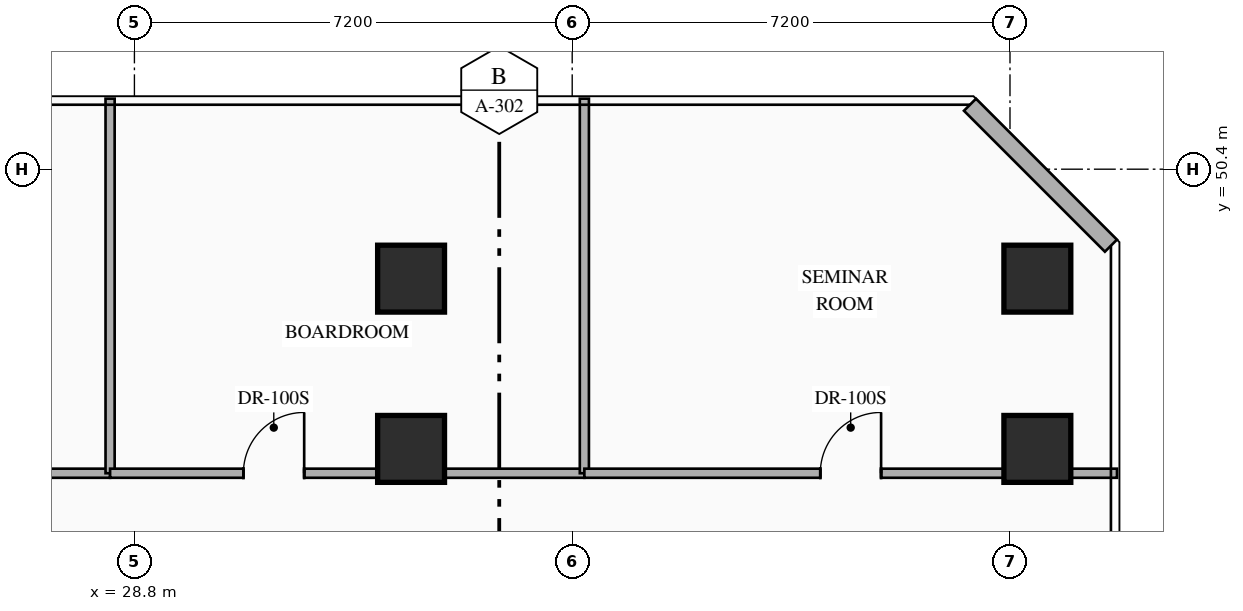
"""IFC4 building model, lengths in metres.
Left out: names, types, materials, properties, quantities, classifications, styles, units other than length and angle.
Written with IfcOpenShell. Run it as: python <this file> out.ifc"""

import sys

from ifc_helpers import new_model, si_unit, direction, frame, frame_2d, origin, origin_2d, place, context, subcontext, project, spatial, rectangle, hollow_rectangle, extrude, element, fill, save


model = new_model("IFC4")
c1 = context("Model", 3, precision=1e-05, world=origin(), true_north=direction((0.0, 1.0)))
c2 = subcontext(c1, "Body", "Model", "MODEL_VIEW")
j1 = project(units=[si_unit("LENGTHUNIT", "METRE"), si_unit("PLANEANGLEUNIT", "RADIAN")], contexts=[c1])
p1 = place(None, origin())
s1 = spatial("IfcSite", under=j1, at=p1, CompositionType="ELEMENT")
p2 = place(p1, origin())
s2 = spatial("IfcBuilding", under=s1, at=p2, CompositionType="ELEMENT")
p3 = place(p2, frame((0.0, 0.0, 21.6)))
s3 = spatial("IfcBuildingStorey", under=s2, at=p3, CompositionType="ELEMENT", Elevation=21.6)
for number, where, z_axis, x_axis in (
    (1, (33.35, 45.8, 0.0), (0.0, 0.0, 1.0), (1.0, 0.0, 0.0)),
    (2, (43.65, 45.8, 0.0), (0.0, 0.0, 1.0), (1.0, 0.0, 0.0)),
    (3, (33.35, 48.6, 0.0), (0.0, 0.0, 1.0), (1.0, 0.0, 0.0)),
    (4, (43.65, 48.6, 0.0), (0.0, 0.0, 1.0), (1.0, 0.0, 0.0)),
):
    element("IfcColumn", number, at=place(p3, frame(where, z_axis=z_axis, x_axis=x_axis)), inside=s3, PredefinedType="COLUMN", context=c2, shape_type="SweptSolid", body=[
        extrude(hollow_rectangle(XDim=1.1, YDim=1.1, WallThickness=0.04, at=origin_2d()), origin(), (0.0, 0.0, 1.0), 5.4),
    ])
p4 = place(p3, frame((42.542, 51.46, 0.0), z_axis=(0.0, 0.0, 1.0), x_axis=(0.707144017911, -0.707069542501, 0.0)))
e5 = element("IfcWall", 5, at=p4, inside=s3, PredefinedType="STANDARD", context=c2, shape_type="SweptSolid", body=[
    extrude(rectangle(XDim=3.278, YDim=0.28, at=frame_2d((1.639, 0.0))), origin(), (0.0, 0.0, 1.0), 5.1),
])
p5 = place(p3, frame((21.9, 45.4, 0.0), z_axis=(0.0, 0.0, 1.0), x_axis=(1.0, 0.0, 0.0)))
e6 = element("IfcWall", 6, at=p5, inside=s3, PredefinedType="PARTITIONING", context=c2, shape_type="SweptSolid", body=[
    extrude(rectangle(XDim=6.5, YDim=0.15, at=frame_2d((3.25, 0.0))), origin(), (0.0, 0.0, 1.0), 5.1),
])
p6 = place(p5, frame((0.859, 0.0, 0.0)))
e7 = element("IfcOpeningElement", 7, at=p6, cuts=e6, PredefinedType="OPENING", context=c2, shape_type="SweptSolid", body=[
    extrude(rectangle(XDim=0.95, YDim=2.15, at=frame_2d((0.475, 1.075))), frame((0.0, 0.085, 0.0), z_axis=(0.0, -1.0, 0.0), x_axis=(1.0, 0.0, 0.0)), (0.0, 0.0, 1.0), 0.17),
])
p7 = place(p3, frame((28.4, 45.4, 0.0), z_axis=(0.0, 0.0, 1.0), x_axis=(0.0, 1.0, 0.0)))
e8 = element("IfcWall", 8, at=p7, inside=s3, PredefinedType="PARTITIONING", context=c2, shape_type="SweptSolid", body=[
    extrude(rectangle(XDim=6.16, YDim=0.15, at=frame_2d((3.08, 0.0))), origin(), (0.0, 0.0, 1.0), 5.1),
])
p8 = place(p3, frame((28.4, 45.4, 0.0), z_axis=(0.0, 0.0, 1.0), x_axis=(1.0, 0.0, 0.0)))
e9 = element("IfcWall", 9, at=p8, inside=s3, PredefinedType="PARTITIONING", context=c2, shape_type="SweptSolid", body=[
    extrude(rectangle(XDim=7.8, YDim=0.15, at=frame_2d((3.9, 0.0))), origin(), (0.0, 0.0, 1.0), 5.1),
])
p9 = place(p8, frame((2.192, 0.0, 0.0)))
e10 = element("IfcOpeningElement", 10, at=p9, cuts=e9, PredefinedType="OPENING", context=c2, shape_type="SweptSolid", body=[
    extrude(rectangle(XDim=1.0, YDim=2.15, at=frame_2d((0.5, 1.075))), frame((0.0, 0.085, 0.0), z_axis=(0.0, -1.0, 0.0), x_axis=(1.0, 0.0, 0.0)), (0.0, 0.0, 1.0), 0.17),
])
p10 = place(p3, frame((36.2, 45.4, 0.0), z_axis=(0.0, 0.0, 1.0), x_axis=(0.0, 1.0, 0.0)))
e11 = element("IfcWall", 11, at=p10, inside=s3, PredefinedType="PARTITIONING", context=c2, shape_type="SweptSolid", body=[
    extrude(rectangle(XDim=6.16, YDim=0.15, at=frame_2d((3.08, 0.0))), origin(), (0.0, 0.0, 1.0), 5.1),
])
p11 = place(p3, frame((36.2, 45.4, 0.0), z_axis=(0.0, 0.0, 1.0), x_axis=(1.0, 0.0, 0.0)))
e12 = element("IfcWall", 12, at=p11, inside=s3, PredefinedType="PARTITIONING", context=c2, shape_type="SweptSolid", body=[
    extrude(rectangle(XDim=8.76, YDim=0.15, at=frame_2d((4.38, 0.0))), origin(), (0.0, 0.0, 1.0), 5.1),
])
p12 = place(p11, frame((3.88, 0.0, 0.0)))
e13 = element("IfcOpeningElement", 13, at=p12, cuts=e12, PredefinedType="OPENING", context=c2, shape_type="SweptSolid", body=[
    extrude(rectangle(XDim=1.0, YDim=2.15, at=frame_2d((0.5, 1.075))), frame((0.0, 0.085, 0.0), z_axis=(0.0, -1.0, 0.0), x_axis=(1.0, 0.0, 0.0)), (0.0, 0.0, 1.0), 0.17),
])
p13 = place(p9, origin())
e14 = element("IfcDoor", 14, at=p13, inside=s3, OperationType="SINGLE_SWING_RIGHT", PredefinedType="DOOR", context=c2, shape_type="SweptSolid", body=[
    extrude(rectangle(XDim=1.0, YDim=2.15, at=frame_2d((0.5, 1.075))), frame((0.0, 0.025, 0.0), z_axis=(0.0, -1.0, 0.0), x_axis=(1.0, 0.0, 0.0)), (0.0, 0.0, 1.0), 0.05),
])
fill(e10, e14)
p14 = place(p12, origin())
e15 = element("IfcDoor", 15, at=p14, inside=s3, OperationType="SINGLE_SWING_RIGHT", PredefinedType="DOOR", context=c2, shape_type="SweptSolid", body=[
    extrude(rectangle(XDim=1.0, YDim=2.15, at=frame_2d((0.5, 1.075))), frame((0.0, 0.025, 0.0), z_axis=(0.0, -1.0, 0.0), x_axis=(1.0, 0.0, 0.0)), (0.0, 0.0, 1.0), 0.05),
])
fill(e13, e15)
save(model, sys.argv[1])
